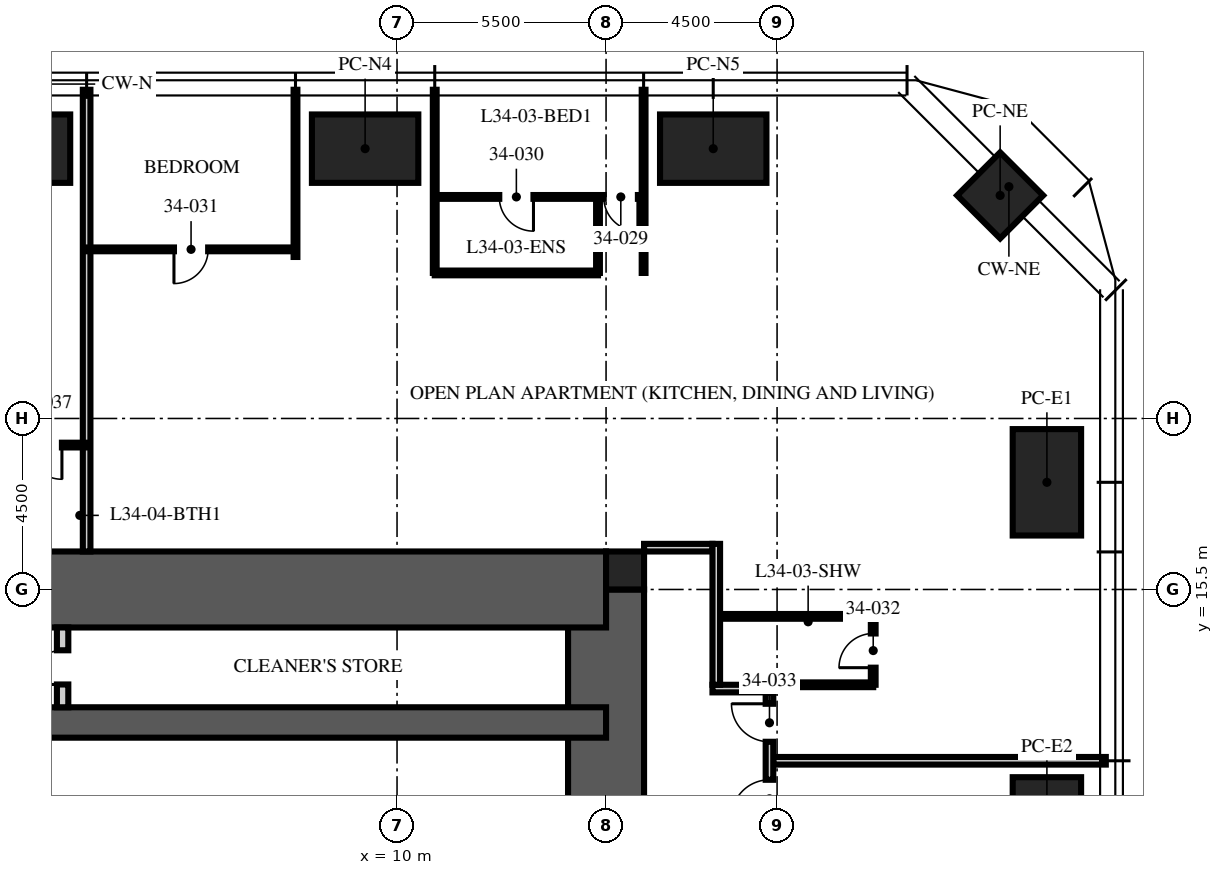
"""IFC4 building model, lengths in metres.
Left out: names, types, materials, properties, quantities, classifications, styles, units other than length and angle.
Written with IfcOpenShell. Run it as: python <this file> out.ifc"""

import sys

from ifc_helpers import new_model, si_unit, direction, frame, frame_2d, origin, origin_2d, place, context, subcontext, project, spatial, rectangle, extrude, element, fill, save


model = new_model("IFC4")
c1 = context("Model", 3, precision=1e-05, world=origin(), true_north=direction((0.0, 1.0)))
c2 = subcontext(c1, "Body", "Model", "MODEL_VIEW")
j1 = project(units=[si_unit("LENGTHUNIT", "METRE"), si_unit("PLANEANGLEUNIT", "RADIAN")], contexts=[c1])
p1 = place(None, origin())
s1 = spatial("IfcSite", under=j1, at=p1, CompositionType="ELEMENT")
p2 = place(p1, origin())
s2 = spatial("IfcBuilding", under=s1, at=p2, CompositionType="ELEMENT")
p3 = place(p2, frame((0.0, 0.0, 137.25)))
s3 = spatial("IfcBuildingStorey", under=s2, at=p3, CompositionType="ELEMENT", Elevation=137.25)
p4 = place(p3, frame((15.5, -15.5, -0.25), z_axis=(0.0, 0.0, 1.0), x_axis=(0.0, 1.0, 0.0)))
e1 = element("IfcWall", 1, at=p4, inside=s3, PredefinedType="SHEAR", context=c2, shape_type="SweptSolid", body=[
    extrude(rectangle(XDim=31.0, YDim=2.0, at=frame_2d((15.5, 0.0))), origin(), (0.0, 0.0, 1.0), 3.75),
])
p5 = place(p4, frame((6.5, 0.0, 0.25)))
e2 = element("IfcOpeningElement", 2, at=p5, cuts=e1, PredefinedType="OPENING", context=c2, shape_type="SweptSolid", body=[
    extrude(rectangle(XDim=1.2, YDim=2.1, at=frame_2d((0.6, 1.05))), frame((0.0, 1.01, 0.0), z_axis=(0.0, -1.0, 0.0), x_axis=(1.0, 0.0, 0.0)), (0.0, 0.0, 1.0), 2.02),
])
p6 = place(p4, frame((23.0, 0.0, 0.25)))
e3 = element("IfcOpeningElement", 3, at=p6, cuts=e1, PredefinedType="OPENING", context=c2, shape_type="SweptSolid", body=[
    extrude(rectangle(XDim=1.8, YDim=2.1, at=frame_2d((0.9, 1.05))), frame((0.0, 1.01, 0.0), z_axis=(0.0, -1.0, 0.0), x_axis=(1.0, 0.0, 0.0)), (0.0, 0.0, 1.0), 2.02),
])
p7 = place(p3, frame((-15.5, 15.5, -0.25), z_axis=(0.0, 0.0, 1.0), x_axis=(1.0, 0.0, 0.0)))
e4 = element("IfcWall", 4, at=p7, inside=s3, PredefinedType="SHEAR", context=c2, shape_type="SweptSolid", body=[
    extrude(rectangle(XDim=31.0, YDim=2.0, at=frame_2d((15.5, 0.0))), origin(), (0.0, 0.0, 1.0), 3.75),
])
p8 = place(p7, frame((5.0, 0.0, 0.25)))
e5 = element("IfcOpeningElement", 5, at=p8, cuts=e4, PredefinedType="OPENING", context=c2, shape_type="SweptSolid", body=[
    extrude(rectangle(XDim=1.0, YDim=2.1, at=frame_2d((0.5, 1.05))), frame((0.0, 1.01, 0.0), z_axis=(0.0, -1.0, 0.0), x_axis=(1.0, 0.0, 0.0)), (0.0, 0.0, 1.0), 2.02),
])
p9 = place(p3, frame((-15.5, 12.0, -0.25), z_axis=(0.0, 0.0, 1.0), x_axis=(1.0, 0.0, 0.0)))
e6 = element("IfcWall", 6, at=p9, inside=s3, PredefinedType="SHEAR", context=c2, shape_type="SweptSolid", body=[
    extrude(rectangle(XDim=31.0, YDim=0.8, at=frame_2d((15.5, 0.0))), origin(), (0.0, 0.0, 1.0), 3.75),
])
p10 = place(p3, frame((16.0, 16.0, -0.25), z_axis=(0.0, 0.0, 1.0), x_axis=(1.0, 0.0, 0.0)))
e7 = element("IfcColumn", 7, at=p10, inside=s3, PredefinedType="COLUMN", context=c2, shape_type="SweptSolid", body=[
    extrude(rectangle(XDim=1.0, YDim=1.0, at=origin_2d()), origin(), (0.0, 0.0, 1.0), 3.75),
])
for number, where, z_axis, x_axis in (
    (8, (0.0, 27.1, 0.0), (0.0, 0.0, 1.0), (1.0, 0.0, 0.0)),
    (9, (9.16, 27.1, 0.0), (0.0, 0.0, 1.0), (1.0, 0.0, 0.0)),
    (10, (18.32, 27.1, 0.0), (0.0, 0.0, 1.0), (1.0, 0.0, 0.0)),
    (11, (27.1, 18.32, 0.0), (0.0, 0.0, 1.0), (0.0, 1.0, 0.0)),
    (12, (27.1, 9.16, 0.0), (0.0, 0.0, 1.0), (0.0, 1.0, 0.0)),
):
    element("IfcColumn", number, at=place(p3, frame(where, z_axis=z_axis, x_axis=x_axis)), inside=s3, PredefinedType="COLUMN", context=c2, shape_type="SweptSolid", body=[
        extrude(rectangle(XDim=2.8, YDim=1.8, at=origin_2d()), origin(), (0.0, 0.0, 1.0), 3.75),
    ])
p11 = place(p3, frame((25.87, 25.87, 0.0), z_axis=(0.0, 0.0, 1.0), x_axis=(0.707106781187, -0.707106781187, 0.0)))
e13 = element("IfcColumn", 13, at=p11, inside=s3, PredefinedType="COLUMN", context=c2, shape_type="SweptSolid", body=[
    extrude(rectangle(XDim=1.6, YDim=1.6, at=origin_2d()), origin(), (0.0, 0.0, 1.0), 3.75),
])
p12 = place(p3, frame((1.2, 12.4, 0.0), z_axis=(0.0, 0.0, 1.0), x_axis=(0.0, 1.0, 0.0)))
e14 = element("IfcWall", 14, at=p12, inside=s3, PredefinedType="PARTITIONING", context=c2, shape_type="SweptSolid", body=[
    extrude(rectangle(XDim=2.1, YDim=0.3, at=frame_2d((1.05, 0.0))), origin(), (0.0, 0.0, 1.0), 3.5),
])
p13 = place(p12, frame((0.6, 0.0, 0.0)))
e15 = element("IfcOpeningElement", 15, at=p13, cuts=e14, PredefinedType="OPENING", context=c2, shape_type="SweptSolid", body=[
    extrude(rectangle(XDim=0.9, YDim=2.1, at=frame_2d((0.45, 1.05))), frame((0.0, 0.16, 0.0), z_axis=(0.0, -1.0, 0.0), x_axis=(1.0, 0.0, 0.0)), (0.0, 0.0, 1.0), 0.32),
])
p14 = place(p3, frame((16.5, 16.6, 0.0), z_axis=(0.0, 0.0, 1.0), x_axis=(1.0, 0.0, 0.0)))
e16 = element("IfcWall", 16, at=p14, inside=s3, PredefinedType="PARTITIONING", context=c2, shape_type="SweptSolid", body=[
    extrude(rectangle(XDim=1.8, YDim=0.2, at=frame_2d((0.9, 0.0))), origin(), (0.0, 0.0, 1.0), 2.3),
])
p15 = place(p3, frame((19.9, 10.992, 0.0), z_axis=(0.0, 0.0, 1.0), x_axis=(1.0, 0.0, 0.0)))
e17 = element("IfcWall", 17, at=p15, inside=s3, PredefinedType="PARTITIONING", context=c2, shape_type="SweptSolid", body=[
    extrude(rectangle(XDim=8.75, YDim=0.2, at=frame_2d((4.375, 0.0))), origin(), (0.0, 0.0, 1.0), 2.81),
])
for number, where, z_axis, x_axis in (
    (18, (16.488, 23.83, 0.0), (0.0, 0.0, 1.0), (0.0, 1.0, 0.0)),
    (19, (10.992, 23.83, 0.0), (0.0, 0.0, 1.0), (0.0, 1.0, 0.0)),
):
    element("IfcWall", number, at=place(p3, frame(where, z_axis=z_axis, x_axis=x_axis)), inside=s3, PredefinedType="PARTITIONING", context=c2, shape_type="SweptSolid", body=[
        extrude(rectangle(XDim=4.82, YDim=0.1, at=frame_2d((2.41, 0.0))), origin(), (0.0, 0.0, 1.0), 2.81),
    ])
p16 = place(p3, frame((7.328, 24.25, 0.0), z_axis=(0.0, 0.0, 1.0), x_axis=(0.0, 1.0, 0.0)))
e20 = element("IfcWall", 20, at=p16, inside=s3, PredefinedType="PARTITIONING", context=c2, shape_type="SweptSolid", body=[
    extrude(rectangle(XDim=4.4, YDim=0.1, at=frame_2d((2.2, 0.0))), origin(), (0.0, 0.0, 1.0), 2.81),
])
p17 = place(p3, frame((1.832, 16.5, 0.0), z_axis=(0.0, 0.0, 1.0), x_axis=(0.0, 1.0, 0.0)))
e21 = element("IfcWall", 21, at=p17, inside=s3, PredefinedType="PARTITIONING", context=c2, shape_type="SweptSolid", body=[
    extrude(rectangle(XDim=12.15, YDim=0.2, at=frame_2d((6.075, 0.0))), origin(), (0.0, 0.0, 1.0), 2.81),
])
p18 = place(p3, frame((16.488, 25.83, 0.0), z_axis=(0.0, 0.0, 1.0), x_axis=(-1.0, 0.0, 0.0)))
e22 = element("IfcWall", 22, at=p18, inside=s3, PredefinedType="PARTITIONING", context=c2, shape_type="SweptSolid", body=[
    extrude(rectangle(XDim=5.496, YDim=0.1, at=frame_2d((2.748, 0.0))), origin(), (0.0, 0.0, 1.0), 2.81),
])
p19 = place(p18, frame((0.15, 0.0, 0.0)))
e23 = element("IfcOpeningElement", 23, at=p19, cuts=e22, PredefinedType="OPENING", context=c2, shape_type="SweptSolid", body=[
    extrude(rectangle(XDim=0.9, YDim=2.1, at=frame_2d((0.45, 1.05))), frame((0.0, 0.06, 0.0), z_axis=(0.0, -1.0, 0.0), x_axis=(1.0, 0.0, 0.0)), (0.0, 0.0, 1.0), 0.12),
])
p20 = place(p18, frame((2.898, 0.0, 0.0)))
e24 = element("IfcOpeningElement", 24, at=p20, cuts=e22, PredefinedType="OPENING", context=c2, shape_type="SweptSolid", body=[
    extrude(rectangle(XDim=0.9, YDim=2.1, at=frame_2d((0.45, 1.05))), frame((0.0, 0.06, 0.0), z_axis=(0.0, -1.0, 0.0), x_axis=(1.0, 0.0, 0.0)), (0.0, 0.0, 1.0), 0.12),
])
p21 = place(p3, frame((15.288, 23.83, 0.0), z_axis=(0.0, 0.0, 1.0), x_axis=(0.0, 1.0, 0.0)))
e25 = element("IfcWall", 25, at=p21, inside=s3, PredefinedType="PARTITIONING", context=c2, shape_type="SweptSolid", body=[
    extrude(rectangle(XDim=2.0, YDim=0.1, at=frame_2d((1.0, 0.0))), origin(), (0.0, 0.0, 1.0), 3.5),
])
p22 = place(p3, frame((15.288, 23.83, 0.0), z_axis=(0.0, 0.0, 1.0), x_axis=(-1.0, 0.0, 0.0)))
e26 = element("IfcWall", 26, at=p22, inside=s3, PredefinedType="PARTITIONING", context=c2, shape_type="SweptSolid", body=[
    extrude(rectangle(XDim=4.296, YDim=0.125, at=frame_2d((2.148, 0.0))), origin(), (0.0, 0.0, 1.0), 2.81),
])
p23 = place(p3, frame((7.328, 24.45, 0.0), z_axis=(0.0, 0.0, 1.0), x_axis=(-1.0, 0.0, 0.0)))
e27 = element("IfcWall", 27, at=p23, inside=s3, PredefinedType="PARTITIONING", context=c2, shape_type="SweptSolid", body=[
    extrude(rectangle(XDim=5.496, YDim=0.1, at=frame_2d((2.748, 0.0))), origin(), (0.0, 0.0, 1.0), 2.81),
])
p24 = place(p23, frame((2.298, 0.0, 0.0)))
e28 = element("IfcOpeningElement", 28, at=p24, cuts=e27, PredefinedType="OPENING", context=c2, shape_type="SweptSolid", body=[
    extrude(rectangle(XDim=0.9, YDim=2.1, at=frame_2d((0.45, 1.05))), frame((0.0, 0.06, 0.0), z_axis=(0.0, -1.0, 0.0), x_axis=(1.0, 0.0, 0.0)), (0.0, 0.0, 1.0), 0.12),
])
p25 = place(p3, frame((22.53, 12.992, 0.0), z_axis=(0.0, 0.0, 1.0), x_axis=(0.0, 1.0, 0.0)))
e29 = element("IfcWall", 29, at=p25, inside=s3, PredefinedType="PARTITIONING", context=c2, shape_type="SweptSolid", body=[
    extrude(rectangle(XDim=1.8, YDim=0.125, at=frame_2d((0.9, 0.0))), origin(), (0.0, 0.0, 1.0), 2.81),
])
p26 = place(p25, frame((0.45, 0.0, 0.0)))
e30 = element("IfcOpeningElement", 30, at=p26, cuts=e29, PredefinedType="OPENING", context=c2, shape_type="SweptSolid", body=[
    extrude(rectangle(XDim=0.9, YDim=2.1, at=frame_2d((0.45, 1.05))), frame((0.0, 0.073, 0.0), z_axis=(0.0, -1.0, 0.0), x_axis=(1.0, 0.0, 0.0)), (0.0, 0.0, 1.0), 0.145),
])
p27 = place(p3, frame((19.97, 12.992, 0.0), z_axis=(0.0, 0.0, 1.0), x_axis=(1.0, 0.0, 0.0)))
e31 = element("IfcWall", 31, at=p27, inside=s3, PredefinedType="PARTITIONING", context=c2, shape_type="SweptSolid", body=[
    extrude(rectangle(XDim=2.56, YDim=0.125, at=frame_2d((1.28, 0.0))), origin(), (0.0, 0.0, 1.0), 3.5),
])
p28 = place(p3, frame((18.5, 14.792, 0.0), z_axis=(0.0, 0.0, 1.0), x_axis=(1.0, 0.0, 0.0)))
e32 = element("IfcWall", 32, at=p28, inside=s3, PredefinedType="PARTITIONING", context=c2, shape_type="SweptSolid", body=[
    extrude(rectangle(XDim=4.03, YDim=0.125, at=frame_2d((2.015, 0.0))), origin(), (0.0, 0.0, 1.0), 3.5),
])
p29 = place(p3, frame((1.832, 19.3, 0.0), z_axis=(0.0, 0.0, 1.0), x_axis=(-1.0, 0.0, 0.0)))
e33 = element("IfcWall", 33, at=p29, inside=s3, PredefinedType="PARTITIONING", context=c2, shape_type="SweptSolid", body=[
    extrude(rectangle(XDim=2.2, YDim=0.125, at=frame_2d((1.1, 0.0))), origin(), (0.0, 0.0, 1.0), 2.7),
])
p30 = place(p29, frame((0.65, 0.0, 0.0)))
e34 = element("IfcOpeningElement", 34, at=p30, cuts=e33, PredefinedType="OPENING", context=c2, shape_type="SweptSolid", body=[
    extrude(rectangle(XDim=0.9, YDim=2.1, at=frame_2d((0.45, 1.05))), frame((0.0, 0.073, 0.0), z_axis=(0.0, -1.0, 0.0), x_axis=(1.0, 0.0, 0.0)), (0.0, 0.0, 1.0), 0.145),
])
p31 = place(p3, frame((18.3, 12.892, 0.0), z_axis=(0.0, 0.0, 1.0), x_axis=(1.0, 0.0, 0.0)))
e35 = element("IfcWall", 35, at=p31, inside=s3, PredefinedType="PARTITIONING", context=c2, shape_type="SweptSolid", body=[
    extrude(rectangle(XDim=1.6, YDim=0.2, at=frame_2d((0.8, 0.0))), origin(), (0.0, 0.0, 1.0), 3.5),
])
p32 = place(p3, frame((19.8, 9.192, 0.0), z_axis=(0.0, 0.0, 1.0), x_axis=(0.0, 1.0, 0.0)))
e36 = element("IfcWall", 36, at=p32, inside=s3, PredefinedType="PARTITIONING", context=c2, shape_type="SweptSolid", body=[
    extrude(rectangle(XDim=3.6, YDim=0.2, at=frame_2d((1.8, 0.0))), origin(), (0.0, 0.0, 1.0), 2.7),
])
p33 = place(p32, frame((0.3, 0.0, 0.0)))
e37 = element("IfcOpeningElement", 37, at=p33, cuts=e36, PredefinedType="OPENING", context=c2, shape_type="SweptSolid", body=[
    extrude(rectangle(XDim=1.0, YDim=2.2, at=frame_2d((0.5, 1.1))), frame((0.0, 0.11, 0.0), z_axis=(0.0, -1.0, 0.0), x_axis=(1.0, 0.0, 0.0)), (0.0, 0.0, 1.0), 0.22),
])
p34 = place(p32, frame((2.3, 0.0, 0.0)))
e38 = element("IfcOpeningElement", 38, at=p34, cuts=e36, PredefinedType="OPENING", context=c2, shape_type="SweptSolid", body=[
    extrude(rectangle(XDim=1.0, YDim=2.2, at=frame_2d((0.5, 1.1))), frame((0.0, 0.11, 0.0), z_axis=(0.0, -1.0, 0.0), x_axis=(1.0, 0.0, 0.0)), (0.0, 0.0, 1.0), 0.22),
])
p35 = place(p3, frame((18.4, 12.992, 0.0), z_axis=(0.0, 0.0, 1.0), x_axis=(0.0, 1.0, 0.0)))
e39 = element("IfcWall", 39, at=p35, inside=s3, PredefinedType="PARTITIONING", context=c2, shape_type="SweptSolid", body=[
    extrude(rectangle(XDim=3.708, YDim=0.2, at=frame_2d((1.854, 0.0))), origin(), (0.0, 0.0, 1.0), 2.81),
])
p36 = place(p13, origin())
e40 = element("IfcDoor", 40, at=p36, inside=s3, OperationType="SINGLE_SWING_LEFT", PredefinedType="DOOR", context=c2, shape_type="SweptSolid", body=[
    extrude(rectangle(XDim=0.9, YDim=2.1, at=frame_2d((0.45, 1.05))), frame((0.0, 0.025, 0.0), z_axis=(0.0, -1.0, 0.0), x_axis=(1.0, 0.0, 0.0)), (0.0, 0.0, 1.0), 0.05),
])
fill(e15, e40)
p37 = place(p33, origin())
e41 = element("IfcDoor", 41, at=p37, inside=s3, OperationType="SINGLE_SWING_LEFT", PredefinedType="DOOR", context=c2, shape_type="SweptSolid", body=[
    extrude(rectangle(XDim=1.0, YDim=2.2, at=frame_2d((0.5, 1.1))), frame((0.0, 0.025, 0.0), z_axis=(0.0, -1.0, 0.0), x_axis=(1.0, 0.0, 0.0)), (0.0, 0.0, 1.0), 0.05),
])
fill(e37, e41)
p38 = place(p19, origin())
e42 = element("IfcDoor", 42, at=p38, inside=s3, OperationType="SINGLE_SWING_LEFT", PredefinedType="DOOR", context=c2, shape_type="SweptSolid", body=[
    extrude(rectangle(XDim=0.9, YDim=2.1, at=frame_2d((0.45, 1.05))), frame((0.0, 0.025, 0.0), z_axis=(0.0, -1.0, 0.0), x_axis=(1.0, 0.0, 0.0)), (0.0, 0.0, 1.0), 0.05),
])
fill(e23, e42)
p39 = place(p20, origin())
e43 = element("IfcDoor", 43, at=p39, inside=s3, OperationType="SINGLE_SWING_LEFT", PredefinedType="DOOR", context=c2, shape_type="SweptSolid", body=[
    extrude(rectangle(XDim=0.9, YDim=2.1, at=frame_2d((0.45, 1.05))), frame((0.0, 0.025, 0.0), z_axis=(0.0, -1.0, 0.0), x_axis=(1.0, 0.0, 0.0)), (0.0, 0.0, 1.0), 0.05),
])
fill(e24, e43)
p40 = place(p24, origin())
e44 = element("IfcDoor", 44, at=p40, inside=s3, OperationType="SINGLE_SWING_RIGHT", PredefinedType="DOOR", context=c2, shape_type="SweptSolid", body=[
    extrude(rectangle(XDim=0.9, YDim=2.1, at=frame_2d((0.45, 1.05))), frame((0.0, 0.025, 0.0), z_axis=(0.0, -1.0, 0.0), x_axis=(1.0, 0.0, 0.0)), (0.0, 0.0, 1.0), 0.05),
])
fill(e28, e44)
p41 = place(p26, origin())
e45 = element("IfcDoor", 45, at=p41, inside=s3, OperationType="SINGLE_SWING_LEFT", PredefinedType="DOOR", context=c2, shape_type="SweptSolid", body=[
    extrude(rectangle(XDim=0.9, YDim=2.1, at=frame_2d((0.45, 1.05))), frame((0.0, 0.025, 0.0), z_axis=(0.0, -1.0, 0.0), x_axis=(1.0, 0.0, 0.0)), (0.0, 0.0, 1.0), 0.05),
])
fill(e30, e45)
p42 = place(p34, origin())
e46 = element("IfcDoor", 46, at=p42, inside=s3, OperationType="SINGLE_SWING_RIGHT", PredefinedType="DOOR", context=c2, shape_type="SweptSolid", body=[
    extrude(rectangle(XDim=1.0, YDim=2.2, at=frame_2d((0.5, 1.1))), frame((0.0, 0.025, 0.0), z_axis=(0.0, -1.0, 0.0), x_axis=(1.0, 0.0, 0.0)), (0.0, 0.0, 1.0), 0.05),
])
fill(e38, e46)
p43 = place(p30, origin())
e47 = element("IfcDoor", 47, at=p43, inside=s3, OperationType="SINGLE_SWING_LEFT", PredefinedType="DOOR", context=c2, shape_type="SweptSolid", body=[
    extrude(rectangle(XDim=0.9, YDim=2.1, at=frame_2d((0.45, 1.05))), frame((0.0, 0.025, 0.0), z_axis=(0.0, -1.0, 0.0), x_axis=(1.0, 0.0, 0.0)), (0.0, 0.0, 1.0), 0.05),
])
fill(e34, e47)
save(model, sys.argv[1])
